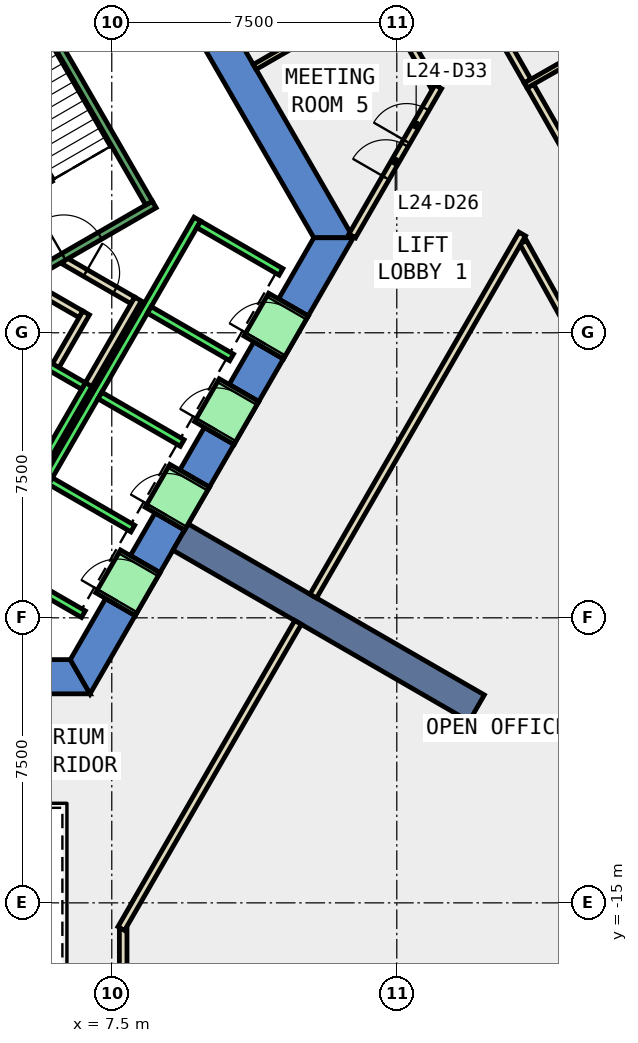
"""IFC4 building model, lengths in metres.
Left out: names, types, materials, properties, quantities, classifications, styles, units other than length and angle.
Written with IfcOpenShell. Run it as: python <this file> out.ifc"""

import sys

from ifc_helpers import new_model, si_unit, direction, frame, frame_2d, origin, place, context, subcontext, project, spatial, polyline, rectangle, outline, extrude, element, fill, save


model = new_model("IFC4")
c1 = context("Model", 3, precision=1e-05, world=origin(), true_north=direction((0.0, 1.0)))
c2 = subcontext(c1, "Body", "Model", "MODEL_VIEW")
j1 = project(units=[si_unit("LENGTHUNIT", "METRE"), si_unit("PLANEANGLEUNIT", "RADIAN")], contexts=[c1])
p1 = place(None, origin())
s1 = spatial("IfcSite", under=j1, at=p1, CompositionType="ELEMENT")
p2 = place(p1, origin())
s2 = spatial("IfcBuilding", under=s1, at=p2, CompositionType="ELEMENT")
p3 = place(p2, frame((0.0, 0.0, 111.8)))
s3 = spatial("IfcBuildingStorey", under=s2, at=p3, CompositionType="ELEMENT", Elevation=111.8)
p4 = place(p3, frame((0.0, 0.0, -0.4)))
e1 = element("IfcWall", 1, at=p4, inside=s3, PredefinedType="SHEAR", context=c2, shape_type="SweptSolid", body=[
    extrude(outline(polyline([(8.517, 11.748), (7.738, 11.298), (12.817, 2.5), (13.856, 2.5), (8.517, 11.748)])), origin(), (0.0, 0.0, 1.0), 4.2),
])
p5 = place(p3, frame((0.0, 0.0, -0.4)))
e2 = element("IfcWall", 2, at=p5, inside=s3, PredefinedType="SHEAR", context=c2, shape_type="SweptSolid", body=[
    extrude(outline(polyline([(5.75, -8.6), (5.75, -9.5), (6.928, -9.5), (6.409, -8.6), (5.75, -8.6)])), origin(), (0.0, 0.0, 1.0), 4.2),
])
p6 = place(p3, frame((0.0, 0.0, -0.4)))
e3 = element("IfcWall", 3, at=p6, inside=s3, PredefinedType="SHEAR", context=c2, shape_type="SweptSolid", body=[
    extrude(outline(polyline([(8.117, -7.44), (7.338, -6.99), (6.409, -8.6), (6.928, -9.5), (8.117, -7.44)])), origin(), (0.0, 0.0, 1.0), 4.2),
])
p7 = place(p3, frame((0.0, 0.0, -0.4)))
e4 = element("IfcWall", 4, at=p7, inside=s3, PredefinedType="SHEAR", context=c2, shape_type="SweptSolid", body=[
    extrude(outline(polyline([(9.417, -5.189), (8.638, -4.739), (7.988, -5.864), (8.767, -6.314), (9.417, -5.189)])), origin(), (0.0, 0.0, 1.0), 4.2),
])
p8 = place(p3, frame((0.0, 0.0, -0.4)))
e5 = element("IfcWall", 5, at=p8, inside=s3, PredefinedType="SHEAR", context=c2, shape_type="SweptSolid", body=[
    extrude(outline(polyline([(10.717, -2.937), (9.938, -2.487), (9.288, -3.613), (10.067, -4.063), (10.717, -2.937)])), origin(), (0.0, 0.0, 1.0), 4.2),
])
p9 = place(p3, frame((0.0, 0.0, -0.4)))
e6 = element("IfcWall", 6, at=p9, inside=s3, PredefinedType="SHEAR", context=c2, shape_type="SweptSolid", body=[
    extrude(outline(polyline([(12.017, -0.686), (11.238, -0.236), (10.588, -1.361), (11.367, -1.811), (12.017, -0.686)])), origin(), (0.0, 0.0, 1.0), 4.2),
])
p10 = place(p3, frame((0.0, 0.0, -0.4)))
e7 = element("IfcWall", 7, at=p10, inside=s3, PredefinedType="SHEAR", context=c2, shape_type="SweptSolid", body=[
    extrude(outline(polyline([(11.888, 0.89), (12.667, 0.44), (13.856, 2.5), (12.817, 2.5), (11.888, 0.89)])), origin(), (0.0, 0.0, 1.0), 4.2),
])
p11 = place(p3, frame((0.0, 0.0, 3.6)))
e8 = element("IfcWall", 8, at=p11, inside=s3, PredefinedType="SHEAR", context=c2, shape_type="SweptSolid", body=[
    extrude(outline(polyline([(8.767, -6.314), (7.988, -5.864), (7.338, -6.99), (8.117, -7.44), (8.767, -6.314)])), origin(), (0.0, 0.0, 1.0), 0.2),
])
p12 = place(p3, frame((0.0, 0.0, 3.6)))
e9 = element("IfcWall", 9, at=p12, inside=s3, PredefinedType="SHEAR", context=c2, shape_type="SweptSolid", body=[
    extrude(outline(polyline([(10.067, -4.063), (9.288, -3.613), (8.638, -4.739), (9.417, -5.189), (10.067, -4.063)])), origin(), (0.0, 0.0, 1.0), 0.2),
])
p13 = place(p3, frame((0.0, 0.0, 3.6)))
e10 = element("IfcWall", 10, at=p13, inside=s3, PredefinedType="SHEAR", context=c2, shape_type="SweptSolid", body=[
    extrude(outline(polyline([(11.367, -1.811), (10.588, -1.361), (9.938, -2.487), (10.717, -2.937), (11.367, -1.811)])), origin(), (0.0, 0.0, 1.0), 0.2),
])
p14 = place(p3, frame((0.0, 0.0, 3.6)))
e11 = element("IfcWall", 11, at=p14, inside=s3, PredefinedType="SHEAR", context=c2, shape_type="SweptSolid", body=[
    extrude(outline(polyline([(12.667, 0.44), (11.888, 0.89), (11.238, -0.236), (12.017, -0.686), (12.667, 0.44)])), origin(), (0.0, 0.0, 1.0), 0.2),
])
p15 = place(p3, frame((9.31, -5.375, -0.4), z_axis=(0.0, 0.0, 1.0), x_axis=(0.866017533419, -0.500013631625, 0.0)))
e12 = element("IfcWall", 12, at=p15, inside=s3, PredefinedType="SHEAR", context=c2, shape_type="SweptSolid", body=[
    extrude(rectangle(XDim=9.0, YDim=0.8, at=frame_2d((4.5, 0.0))), origin(), (0.0, 0.0, 1.0), 4.2),
])
p16 = place(p3, frame((15.993, 6.473, 0.0), z_axis=(0.0, 0.0, 1.0), x_axis=(-0.495159881733, 0.86880187127, 0.0)))
e13 = element("IfcWall", 13, at=p16, inside=s3, PredefinedType="PARTITIONING", context=c2, shape_type="SweptSolid", body=[
    extrude(rectangle(XDim=2.391, YDim=0.2, at=frame_2d((1.195, 0.0))), origin(), (0.0, 0.0, 1.0), 3.8),
])
p17 = place(p3, frame((21.773, -3.822, 0.0), z_axis=(0.0, 0.0, 1.0), x_axis=(-0.485826874234, 0.874055060206, 0.0)))
e14 = element("IfcWall", 14, at=p17, inside=s3, PredefinedType="PARTITIONING", context=c2, shape_type="SweptSolid", body=[
    extrude(rectangle(XDim=7.099, YDim=0.2, at=frame_2d((3.55, 0.0))), origin(), (0.0, 0.0, 1.0), 3.8),
])
p18 = place(p3, frame((18.515, 6.491, 0.0), z_axis=(0.0, 0.0, 1.0), x_axis=(0.495309264725, -0.868716715781, 0.0)))
e15 = element("IfcWall", 15, at=p18, inside=s3, PredefinedType="PARTITIONING", context=c2, shape_type="SweptSolid", body=[
    extrude(rectangle(XDim=3.487, YDim=0.2, at=frame_2d((1.743, 0.0))), origin(), (0.0, 0.0, 1.0), 3.8),
])
p19 = place(p3, frame((16.714, 9.65, 0.0), z_axis=(0.0, 0.0, 1.0), x_axis=(0.495286549488, -0.868729666753, 0.0)))
e16 = element("IfcWall", 16, at=p19, inside=s3, PredefinedType="PARTITIONING", context=c2, shape_type="SweptSolid", body=[
    extrude(rectangle(XDim=3.487, YDim=0.2, at=frame_2d((1.743, 0.0))), origin(), (0.0, 0.0, 1.0), 3.8),
])
p20 = place(p3, frame((5.499, 1.172, 0.0), z_axis=(0.0, 0.0, 1.0), x_axis=(0.866333505267, -0.499465972466, 0.0)))
e17 = element("IfcWall", 17, at=p20, inside=s3, PredefinedType="PARTITIONING", context=c2, shape_type="SweptSolid", body=[
    extrude(rectangle(XDim=1.374, YDim=0.2, at=frame_2d((0.687, 0.0))), origin(), (0.0, 0.0, 1.0), 3.8),
])
p21 = place(p3, frame((6.826, 0.522, 0.0), z_axis=(0.0, 0.0, 1.0), x_axis=(-0.500016722714, -0.866015748706, 0.0)))
e18 = element("IfcWall", 18, at=p21, inside=s3, PredefinedType="PARTITIONING", context=c2, shape_type="SweptSolid", body=[
    extrude(rectangle(XDim=1.7, YDim=0.2, at=frame_2d((0.85, 0.0))), origin(), (0.0, 0.0, 1.0), 3.8),
])
p22 = place(p3, frame((6.25, 1.894, 0.0), z_axis=(0.0, 0.0, 1.0), x_axis=(0.866043184279, -0.499969202016, 0.0)))
e19 = element("IfcWall", 19, at=p22, inside=s3, PredefinedType="PARTITIONING", context=c2, shape_type="SweptSolid", body=[
    extrude(rectangle(XDim=2.084, YDim=0.2, at=frame_2d((1.042, 0.0))), origin(), (0.0, 0.0, 1.0), 3.8),
])
p23 = place(p22, frame((0.642, 0.0, 0.0)))
e20 = element("IfcOpeningElement", 20, at=p23, cuts=e19, PredefinedType="OPENING", context=c2, shape_type="SweptSolid", body=[
    extrude(rectangle(XDim=0.9, YDim=2.1, at=frame_2d((0.45, 1.05))), frame((0.0, 0.11, 0.0), z_axis=(0.0, -1.0, 0.0), x_axis=(1.0, 0.0, 0.0)), (0.0, 0.0, 1.0), 0.22),
])
p24 = place(p3, frame((8.192, 0.888, 0.0), z_axis=(0.0, 0.0, 1.0), x_axis=(-0.499940625693, -0.866059680843, 0.0)))
e21 = element("IfcWall", 21, at=p24, inside=s3, PredefinedType="PARTITIONING", context=c2, shape_type="SweptSolid", body=[
    extrude(rectangle(XDim=2.68, YDim=0.2, at=frame_2d((1.34, 0.0))), origin(), (0.0, 0.0, 1.0), 3.8),
])
p25 = place(p3, frame((11.261, 6.994, 0.0), z_axis=(0.0, 0.0, 1.0), x_axis=(0.86605248387, 0.499953092981, 0.0)))
e22 = element("IfcWall", 22, at=p25, inside=s3, PredefinedType="PARTITIONING", context=c2, shape_type="SweptSolid", body=[
    extrude(rectangle(XDim=3.848, YDim=0.15, at=frame_2d((1.924, 0.0))), origin(), (0.0, 0.0, 1.0), 3.8),
])
p26 = place(p3, frame((13.827, 2.55, 0.0), z_axis=(0.0, 0.0, 1.0), x_axis=(0.500045913515, 0.865998893981, 0.0)))
e23 = element("IfcWall", 23, at=p26, inside=s3, PredefinedType="PARTITIONING", context=c2, shape_type="SweptSolid", body=[
    extrude(rectangle(XDim=4.53, YDim=0.2, at=frame_2d((2.265, 0.0))), origin(), (0.0, 0.0, 1.0), 3.8),
])
p27 = place(p26, frame((1.765, 0.0, 0.0)))
e24 = element("IfcOpeningElement", 24, at=p27, cuts=e23, PredefinedType="OPENING", context=c2, shape_type="SweptSolid", body=[
    extrude(rectangle(XDim=1.0, YDim=2.1, at=frame_2d((0.5, 1.05))), frame((0.0, 0.11, 0.0), z_axis=(0.0, -1.0, 0.0), x_axis=(1.0, 0.0, 0.0)), (0.0, 0.0, 1.0), 0.22),
])
p28 = place(p26, frame((2.865, 0.0, 0.0)))
e25 = element("IfcOpeningElement", 25, at=p28, cuts=e23, PredefinedType="OPENING", context=c2, shape_type="SweptSolid", body=[
    extrude(rectangle(XDim=1.0, YDim=2.1, at=frame_2d((0.5, 1.05))), frame((0.0, 0.11, 0.0), z_axis=(0.0, -1.0, 0.0), x_axis=(1.0, 0.0, 0.0)), (0.0, 0.0, 1.0), 0.22),
])
p29 = place(p3, frame((7.8, -15.69, 0.0), z_axis=(0.0, 0.0, 1.0), x_axis=(0.0, -1.0, 0.0)))
e26 = element("IfcWall", 26, at=p29, inside=s3, PredefinedType="PARTITIONING", context=c2, shape_type="SweptSolid", body=[
    extrude(rectangle(XDim=1.608, YDim=0.2, at=frame_2d((0.804, 0.0))), origin(), (0.0, 0.0, 1.0), 3.8),
])
p30 = place(p3, frame((18.301, 2.598, 0.0), z_axis=(0.0, 0.0, 1.0), x_axis=(-0.49997732567, -0.866038494419, 0.0)))
e27 = element("IfcWall", 27, at=p30, inside=s3, PredefinedType="PARTITIONING", context=c2, shape_type="SweptSolid", body=[
    extrude(rectangle(XDim=11.0, YDim=0.2, at=frame_2d((5.5, 0.0))), origin(), (0.0, 0.0, 1.0), 3.8),
])
p31 = place(p3, frame((18.391, 6.506, 0.0), z_axis=(0.0, 0.0, 1.0), x_axis=(0.868738258528, 0.495271479261, 0.0)))
e28 = element("IfcWall", 28, at=p31, inside=s3, PredefinedType="PARTITIONING", context=c2, shape_type="SweptSolid", body=[
    extrude(rectangle(XDim=7.701, YDim=0.15, at=frame_2d((3.85, 0.0))), origin(), (0.0, 0.0, 1.0), 3.8),
])
p32 = place(p3, frame((12.401, -7.621, 0.0), z_axis=(0.0, 0.0, 1.0), x_axis=(-0.499983724212, -0.866034800411, 0.0)))
e29 = element("IfcWall", 29, at=p32, inside=s3, PredefinedType="PARTITIONING", context=c2, shape_type="SweptSolid", body=[
    extrude(rectangle(XDim=9.302, YDim=0.2, at=frame_2d((4.651, 0.0))), origin(), (0.0, 0.0, 1.0), 3.8),
])
p33 = place(p3, frame((5.492, -3.788, 0.0), z_axis=(0.0, 0.0, 1.0), x_axis=(0.500011755427, 0.866018616679, 0.0)))
e30 = element("IfcWall", 30, at=p33, inside=s3, PredefinedType="STANDARD", context=c2, shape_type="SweptSolid", body=[
    extrude(rectangle(XDim=2.8, YDim=0.2, at=frame_2d((1.4, 0.0))), origin(), (0.0, 0.0, 1.0), 3.8),
])
p34 = place(p3, frame((4.677, -0.2, 0.0), z_axis=(0.0, 0.0, 1.0), x_axis=(0.865973769406, -0.500089422704, 0.0)))
e31 = element("IfcWall", 31, at=p34, inside=s3, PredefinedType="STANDARD", context=c2, shape_type="SweptSolid", body=[
    extrude(rectangle(XDim=2.399, YDim=0.2, at=frame_2d((1.2, 0.0))), origin(), (0.0, 0.0, 1.0), 3.8),
])
p35 = place(p3, frame((4.451, -6.19, 0.0), z_axis=(0.0, 0.0, 1.0), x_axis=(0.50000090737, 0.866024879913, 0.0)))
e32 = element("IfcWall", 32, at=p35, inside=s3, PredefinedType="STANDARD", context=c2, shape_type="SweptSolid", body=[
    extrude(rectangle(XDim=10.6, YDim=0.2, at=frame_2d((5.3, 0.0))), origin(), (0.0, 0.0, 1.0), 3.8),
])
for number, where, z_axis, x_axis in (
    (33, (4.588, -6.153, 0.0), (0.0, 0.0, 1.0), (0.866, -0.5, 0.0)),
    (34, (5.888, -3.902, 0.0), (0.0, 0.0, 1.0), (0.866, -0.5, 0.0)),
    (35, (7.188, -1.65, 0.0), (0.0, 0.0, 1.0), (0.866, -0.5, 0.0)),
    (36, (8.488, 0.602, 0.0), (0.0, 0.0, 1.0), (0.866, -0.5, 0.0)),
):
    element("IfcWall", number, at=place(p3, frame(where, z_axis=z_axis, x_axis=x_axis)), inside=s3, PredefinedType="STANDARD", context=c2, shape_type="SweptSolid", body=[
        extrude(rectangle(XDim=2.5, YDim=0.2, at=frame_2d((1.25, 0.0))), origin(), (0.0, 0.0, 1.0), 3.8),
    ])
p36 = place(p3, frame((9.788, 2.853, 0.0), z_axis=(0.0, 0.0, 1.0), x_axis=(0.865998541277, -0.500046524342, 0.0)))
e37 = element("IfcWall", 37, at=p36, inside=s3, PredefinedType="STANDARD", context=c2, shape_type="SweptSolid", body=[
    extrude(rectangle(XDim=2.5, YDim=0.2, at=frame_2d((1.25, 0.0))), origin(), (0.0, 0.0, 1.0), 3.8),
])
p37 = place(p3, frame((7.598, -7.14, 0.0), z_axis=(0.0, 0.0, 1.0), x_axis=(0.500362116554, 0.865816234728, 0.0)))
e38 = element("IfcWall", 38, at=p37, inside=s3, PredefinedType="STANDARD", context=c2, shape_type="SweptSolid", body=[
    extrude(rectangle(XDim=1.299, YDim=1.2, at=frame_2d((0.65, 0.0))), origin(), (0.0, 0.0, 1.0), 2.4),
])
p38 = place(p37, frame((0.1, 0.0, 0.0)))
e39 = element("IfcOpeningElement", 39, at=p38, cuts=e38, PredefinedType="OPENING", context=c2, shape_type="SweptSolid", body=[
    extrude(rectangle(XDim=1.1, YDim=2.3, at=frame_2d((0.55, 1.15))), frame((0.0, 0.61, 0.0), z_axis=(0.0, -1.0, 0.0), x_axis=(1.0, 0.0, 0.0)), (0.0, 0.0, 1.0), 1.22),
])
p39 = place(p3, frame((8.898, -4.889, 0.0), z_axis=(0.0, 0.0, 1.0), x_axis=(0.500036693733, 0.866004217611, 0.0)))
e40 = element("IfcWall", 40, at=p39, inside=s3, PredefinedType="STANDARD", context=c2, shape_type="SweptSolid", body=[
    extrude(rectangle(XDim=1.3, YDim=1.2, at=frame_2d((0.65, 0.0))), origin(), (0.0, 0.0, 1.0), 2.4),
])
p40 = place(p39, frame((0.1, 0.0, 0.0)))
e41 = element("IfcOpeningElement", 41, at=p40, cuts=e40, PredefinedType="OPENING", context=c2, shape_type="SweptSolid", body=[
    extrude(rectangle(XDim=1.1, YDim=2.3, at=frame_2d((0.55, 1.15))), frame((0.0, 0.61, 0.0), z_axis=(0.0, -1.0, 0.0), x_axis=(1.0, 0.0, 0.0)), (0.0, 0.0, 1.0), 1.22),
])
p41 = place(p3, frame((10.198, -2.637, 0.0), z_axis=(0.0, 0.0, 1.0), x_axis=(0.49989585183, 0.866085525409, 0.0)))
e42 = element("IfcWall", 42, at=p41, inside=s3, PredefinedType="STANDARD", context=c2, shape_type="SweptSolid", body=[
    extrude(rectangle(XDim=1.3, YDim=1.2, at=frame_2d((0.65, 0.0))), origin(), (0.0, 0.0, 1.0), 2.4),
])
p42 = place(p41, frame((0.1, 0.0, 0.0)))
e43 = element("IfcOpeningElement", 43, at=p42, cuts=e42, PredefinedType="OPENING", context=c2, shape_type="SweptSolid", body=[
    extrude(rectangle(XDim=1.1, YDim=2.3, at=frame_2d((0.55, 1.15))), frame((0.0, 0.61, 0.0), z_axis=(0.0, -1.0, 0.0), x_axis=(1.0, 0.0, 0.0)), (0.0, 0.0, 1.0), 1.22),
])
p43 = place(p3, frame((11.498, -0.385, 0.0), z_axis=(0.0, 0.0, 1.0), x_axis=(0.500221244143, 0.865897630733, 0.0)))
e44 = element("IfcWall", 44, at=p43, inside=s3, PredefinedType="STANDARD", context=c2, shape_type="SweptSolid", body=[
    extrude(rectangle(XDim=1.299, YDim=1.2, at=frame_2d((0.65, 0.0))), origin(), (0.0, 0.0, 1.0), 2.4),
])
p44 = place(p43, frame((0.1, 0.0, 0.0)))
e45 = element("IfcOpeningElement", 45, at=p44, cuts=e44, PredefinedType="OPENING", context=c2, shape_type="SweptSolid", body=[
    extrude(rectangle(XDim=1.1, YDim=2.3, at=frame_2d((0.55, 1.15))), frame((0.0, 0.61, 0.0), z_axis=(0.0, -1.0, 0.0), x_axis=(1.0, 0.0, 0.0)), (0.0, 0.0, 1.0), 1.22),
])
p45 = place(p3, frame((4.806, 1.176, 0.0), z_axis=(0.0, 0.0, 1.0), x_axis=(0.866059941101, 0.499940174841, 0.0)))
e46 = element("IfcWall", 46, at=p45, inside=s3, PredefinedType="STANDARD", context=c2, shape_type="SweptSolid", body=[
    extrude(rectangle(XDim=4.4, YDim=0.2, at=frame_2d((2.2, 0.0))), origin(), (0.0, 0.0, 1.0), 3.8),
])
p46 = place(p45, frame((1.65, 0.0, 0.0)))
e47 = element("IfcOpeningElement", 47, at=p46, cuts=e46, PredefinedType="OPENING", context=c2, shape_type="SweptSolid", body=[
    extrude(rectangle(XDim=1.1, YDim=2.2, at=frame_2d((0.55, 1.1))), frame((0.0, 0.11, 0.0), z_axis=(0.0, -1.0, 0.0), x_axis=(1.0, 0.0, 0.0)), (0.0, 0.0, 1.0), 0.22),
])
p47 = place(p3, frame((8.48, 3.412, 0.0), z_axis=(0.0, 0.0, 1.0), x_axis=(-0.499978703459, 0.866037698999, 0.0)))
e48 = element("IfcWall", 48, at=p47, inside=s3, PredefinedType="STANDARD", context=c2, shape_type="SweptSolid", body=[
    extrude(rectangle(XDim=6.9, YDim=0.2, at=frame_2d((3.45, 0.0))), origin(), (0.0, 0.0, 1.0), 3.8),
])
p48 = place(p27, origin())
e49 = element("IfcDoor", 49, at=p48, inside=s3, OperationType="SINGLE_SWING_LEFT", PredefinedType="DOOR", context=c2, shape_type="SweptSolid", body=[
    extrude(rectangle(XDim=1.0, YDim=2.1, at=frame_2d((0.5, 1.05))), frame((0.0, 0.025, 0.0), z_axis=(0.0, -1.0, 0.0), x_axis=(1.0, 0.0, 0.0)), (0.0, 0.0, 1.0), 0.05),
])
fill(e24, e49)
p49 = place(p23, origin())
e50 = element("IfcDoor", 50, at=p49, inside=s3, OperationType="SINGLE_SWING_LEFT", PredefinedType="DOOR", context=c2, shape_type="SweptSolid", body=[
    extrude(rectangle(XDim=0.9, YDim=2.1, at=frame_2d((0.45, 1.05))), frame((0.0, 0.025, 0.0), z_axis=(0.0, -1.0, 0.0), x_axis=(1.0, 0.0, 0.0)), (0.0, 0.0, 1.0), 0.05),
])
fill(e20, e50)
p50 = place(p28, origin())
e51 = element("IfcDoor", 51, at=p50, inside=s3, OperationType="SINGLE_SWING_RIGHT", PredefinedType="DOOR", context=c2, shape_type="SweptSolid", body=[
    extrude(rectangle(XDim=1.0, YDim=2.1, at=frame_2d((0.5, 1.05))), frame((0.0, 0.025, 0.0), z_axis=(0.0, -1.0, 0.0), x_axis=(1.0, 0.0, 0.0)), (0.0, 0.0, 1.0), 0.05),
])
fill(e25, e51)
p51 = place(p38, origin())
e52 = element("IfcDoor", 52, at=p51, inside=s3, OperationType="SLIDING_TO_LEFT", PredefinedType="DOOR", context=c2, shape_type="SweptSolid", body=[
    extrude(rectangle(XDim=1.1, YDim=2.3, at=frame_2d((0.55, 1.15))), frame((0.0, 0.025, 0.0), z_axis=(0.0, -1.0, 0.0), x_axis=(1.0, 0.0, 0.0)), (0.0, 0.0, 1.0), 0.05),
])
fill(e39, e52)
p52 = place(p40, origin())
e53 = element("IfcDoor", 53, at=p52, inside=s3, OperationType="SLIDING_TO_LEFT", PredefinedType="DOOR", context=c2, shape_type="SweptSolid", body=[
    extrude(rectangle(XDim=1.1, YDim=2.3, at=frame_2d((0.55, 1.15))), frame((0.0, 0.025, 0.0), z_axis=(0.0, -1.0, 0.0), x_axis=(1.0, 0.0, 0.0)), (0.0, 0.0, 1.0), 0.05),
])
fill(e41, e53)
p53 = place(p42, origin())
e54 = element("IfcDoor", 54, at=p53, inside=s3, OperationType="SLIDING_TO_LEFT", PredefinedType="DOOR", context=c2, shape_type="SweptSolid", body=[
    extrude(rectangle(XDim=1.1, YDim=2.3, at=frame_2d((0.55, 1.15))), frame((0.0, 0.025, 0.0), z_axis=(0.0, -1.0, 0.0), x_axis=(1.0, 0.0, 0.0)), (0.0, 0.0, 1.0), 0.05),
])
fill(e43, e54)
p54 = place(p44, origin())
e55 = element("IfcDoor", 55, at=p54, inside=s3, OperationType="SLIDING_TO_LEFT", PredefinedType="DOOR", context=c2, shape_type="SweptSolid", body=[
    extrude(rectangle(XDim=1.1, YDim=2.3, at=frame_2d((0.55, 1.15))), frame((0.0, 0.025, 0.0), z_axis=(0.0, -1.0, 0.0), x_axis=(1.0, 0.0, 0.0)), (0.0, 0.0, 1.0), 0.05),
])
fill(e45, e55)
p55 = place(p46, origin())
e56 = element("IfcDoor", 56, at=p55, inside=s3, OperationType="SINGLE_SWING_LEFT", PredefinedType="DOOR", context=c2, shape_type="SweptSolid", body=[
    extrude(rectangle(XDim=1.1, YDim=2.2, at=frame_2d((0.55, 1.1))), frame((0.0, 0.025, 0.0), z_axis=(0.0, -1.0, 0.0), x_axis=(1.0, 0.0, 0.0)), (0.0, 0.0, 1.0), 0.05),
])
fill(e47, e56)
save(model, sys.argv[1])
